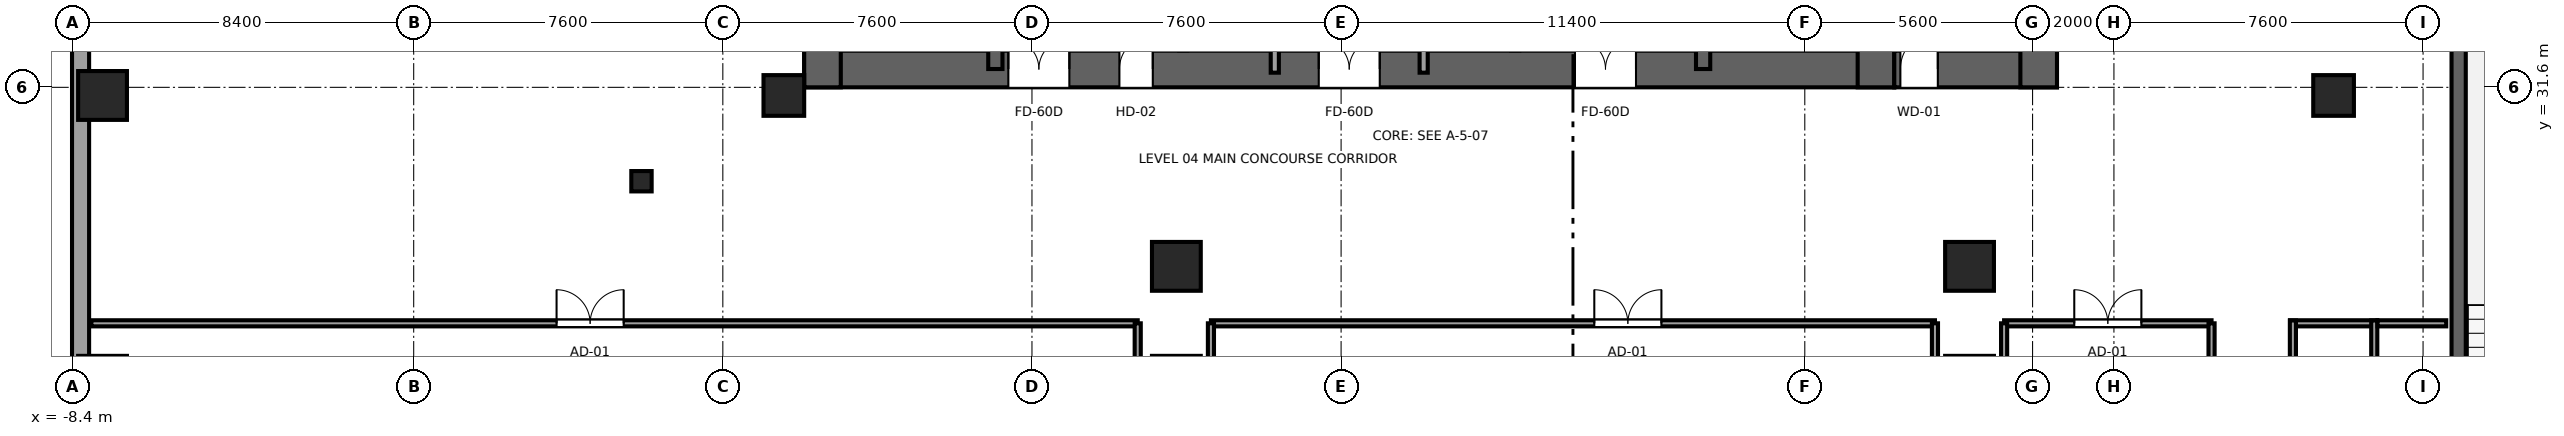
"""IFC4 building model, lengths in metres.
Left out: names, types, materials, properties, quantities, classifications, styles, units other than length and angle.
Written with IfcOpenShell. Run it as: python <this file> out.ifc"""

import sys

from ifc_helpers import new_model, si_unit, direction, frame, frame_2d, origin, origin_2d, place, context, subcontext, project, spatial, rectangle, i_section, extrude, source, transform, mapped, element, fill, save


model = new_model("IFC4")
c1 = context("Model", 3, precision=1e-05, world=origin(), true_north=direction((0.0, 1.0)))
c2 = subcontext(c1, "Body", "Model", "MODEL_VIEW")
j1 = project(units=[si_unit("LENGTHUNIT", "METRE"), si_unit("PLANEANGLEUNIT", "RADIAN")], contexts=[c1])
p1 = place(None, origin())
s1 = spatial("IfcSite", under=j1, at=p1, CompositionType="ELEMENT")
p2 = place(p1, origin())
s2 = spatial("IfcBuilding", under=s1, at=p2, CompositionType="ELEMENT")
p3 = place(p2, frame((0.0, 0.0, 22.4)))
s3 = spatial("IfcBuildingStorey", under=s2, at=p3, CompositionType="ELEMENT", Elevation=22.4)
p4 = place(p3, frame((9.6, 32.05, 0.0), z_axis=(0.0, 0.0, 1.0), x_axis=(1.0, 0.0, 0.0)))
e1 = element("IfcWall", 1, at=p4, inside=s3, PredefinedType="SHEAR", context=c2, shape_type="SweptSolid", body=[
    extrude(rectangle(XDim=26.8, YDim=0.9, at=frame_2d((13.4, 0.0))), origin(), (0.0, 0.0, 1.0), 4.4),
])
p5 = place(p4, frame((6.52, 0.0, 0.0), z_axis=(0.0, 0.0, 1.0), x_axis=(-1.0, 0.0, 0.0)))
e2 = element("IfcOpeningElement", 2, at=p5, cuts=e1, PredefinedType="OPENING", context=c2, shape_type="SweptSolid", body=[
    extrude(rectangle(XDim=1.5, YDim=2.04, at=frame_2d((0.75, 1.02))), frame((0.0, 0.46, 0.0), z_axis=(0.0, -1.0, 0.0), x_axis=(1.0, 0.0, 0.0)), (0.0, 0.0, 1.0), 0.92),
])
p6 = place(p4, frame((14.15, 0.0, 0.0), z_axis=(0.0, 0.0, 1.0), x_axis=(-1.0, 0.0, 0.0)))
e3 = element("IfcOpeningElement", 3, at=p6, cuts=e1, PredefinedType="OPENING", context=c2, shape_type="SweptSolid", body=[
    extrude(rectangle(XDim=1.5, YDim=2.04, at=frame_2d((0.75, 1.02))), frame((0.0, 0.46, 0.0), z_axis=(0.0, -1.0, 0.0), x_axis=(1.0, 0.0, 0.0)), (0.0, 0.0, 1.0), 0.92),
])
p7 = place(p4, frame((20.45, 0.0, 0.0), z_axis=(0.0, 0.0, 1.0), x_axis=(-1.0, 0.0, 0.0)))
e4 = element("IfcOpeningElement", 4, at=p7, cuts=e1, PredefinedType="OPENING", context=c2, shape_type="SweptSolid", body=[
    extrude(rectangle(XDim=1.5, YDim=2.04, at=frame_2d((0.75, 1.02))), frame((0.0, 0.46, 0.0), z_axis=(0.0, -1.0, 0.0), x_axis=(1.0, 0.0, 0.0)), (0.0, 0.0, 1.0), 0.92),
])
p8 = place(p4, frame((8.57, 0.0, 0.0), z_axis=(0.0, 0.0, 1.0), x_axis=(-1.0, 0.0, 0.0)))
e5 = element("IfcOpeningElement", 5, at=p8, cuts=e1, PredefinedType="OPENING", context=c2, shape_type="SweptSolid", body=[
    extrude(rectangle(XDim=0.82, YDim=2.01, at=frame_2d((0.41, 1.005))), frame((0.0, 0.46, 0.0), z_axis=(0.0, -1.0, 0.0), x_axis=(1.0, 0.0, 0.0)), (0.0, 0.0, 1.0), 0.92),
])
for number, where, z_axis, x_axis in (
    (6, (10.05, 31.6, 0.0), (0.0, 0.0, 1.0), (0.0, 1.0, 0.0)),
    (7, (35.95, 31.6, 0.0), (0.0, 0.0, 1.0), (0.0, 1.0, 0.0)),
):
    element("IfcWall", number, at=place(p3, frame(where, z_axis=z_axis, x_axis=x_axis)), inside=s3, PredefinedType="SHEAR", context=c2, shape_type="SweptSolid", body=[
        extrude(rectangle(XDim=13.6, YDim=0.9, at=frame_2d((6.8, 0.0))), origin(), (0.0, 0.0, 1.0), 4.4),
    ])
p9 = place(p3, frame((14.3, 32.05, 0.0), z_axis=(0.0, 0.0, 1.0), x_axis=(0.0, 1.0, 0.0)))
e8 = element("IfcWall", 8, at=p9, inside=s3, PredefinedType="SHEAR", context=c2, shape_type="SweptSolid", body=[
    extrude(rectangle(XDim=12.7, YDim=0.35, at=frame_2d((6.35, 0.0))), origin(), (0.0, 0.0, 1.0), 4.4),
])
p10 = place(p9, frame((0.5, 0.0, 0.0)))
e9 = element("IfcOpeningElement", 9, at=p10, cuts=e8, PredefinedType="OPENING", context=c2, shape_type="SweptSolid", body=[
    extrude(rectangle(XDim=1.1, YDim=2.12, at=frame_2d((0.55, 1.06))), frame((0.0, 0.185, 0.0), z_axis=(0.0, -1.0, 0.0), x_axis=(1.0, 0.0, 0.0)), (0.0, 0.0, 1.0), 0.37),
])
p11 = place(p3, frame((31.7, 32.05, 0.0), z_axis=(0.0, 0.0, 1.0), x_axis=(0.0, 1.0, 0.0)))
e10 = element("IfcWall", 10, at=p11, inside=s3, PredefinedType="SHEAR", context=c2, shape_type="SweptSolid", body=[
    extrude(rectangle(XDim=12.7, YDim=0.35, at=frame_2d((6.35, 0.0))), origin(), (0.0, 0.0, 1.0), 4.4),
])
p12 = place(p11, frame((1.6, 0.0, 0.0), z_axis=(0.0, 0.0, 1.0), x_axis=(-1.0, 0.0, 0.0)))
e11 = element("IfcOpeningElement", 11, at=p12, cuts=e10, PredefinedType="OPENING", context=c2, shape_type="SweptSolid", body=[
    extrude(rectangle(XDim=1.1, YDim=2.12, at=frame_2d((0.55, 1.06))), frame((0.0, 0.185, 0.0), z_axis=(0.0, -1.0, 0.0), x_axis=(1.0, 0.0, 0.0)), (0.0, 0.0, 1.0), 0.37),
])
p13 = place(p3, frame((36.4, 32.05, 0.0), z_axis=(0.0, 0.0, 1.0), x_axis=(1.0, 0.0, 0.0)))
e12 = element("IfcWall", 12, at=p13, inside=s3, PredefinedType="SHEAR", context=c2, shape_type="SweptSolid", body=[
    extrude(rectangle(XDim=4.0, YDim=0.9, at=frame_2d((2.0, 0.0))), origin(), (0.0, 0.0, 1.0), 4.4),
])
p14 = place(p13, frame((1.07, 0.0, 0.0), z_axis=(0.0, 0.0, 1.0), x_axis=(-1.0, 0.0, 0.0)))
e13 = element("IfcOpeningElement", 13, at=p14, cuts=e12, PredefinedType="OPENING", context=c2, shape_type="SweptSolid", body=[
    extrude(rectangle(XDim=0.92, YDim=2.01, at=frame_2d((0.46, 1.005))), frame((0.0, 0.46, 0.0), z_axis=(0.0, -1.0, 0.0), x_axis=(1.0, 0.0, 0.0)), (0.0, 0.0, 1.0), 0.92),
])
p15 = place(p3, frame((39.95, 31.6, 0.0), z_axis=(0.0, 0.0, 1.0), x_axis=(0.0, 1.0, 0.0)))
e14 = element("IfcWall", 14, at=p15, inside=s3, PredefinedType="SHEAR", context=c2, shape_type="SweptSolid", body=[
    extrude(rectangle(XDim=13.6, YDim=0.9, at=frame_2d((6.8, 0.0))), origin(), (0.0, 0.0, 1.0), 4.4),
])
p16 = place(p3, frame((50.275, 32.975, 0.0), z_axis=(0.0, 0.0, 1.0), x_axis=(0.0, -1.0, 0.0)))
e15 = element("IfcWall", 15, at=p16, inside=s3, PredefinedType="SHEAR", context=c2, shape_type="SweptSolid", body=[
    extrude(rectangle(XDim=12.95, YDim=0.35, at=frame_2d((6.475, 0.0))), origin(), (0.0, 0.0, 1.0), 4.4),
])
m1 = source(origin(), c2, "Body", "SweptSolid", [
    extrude(rectangle(XDim=1.2, YDim=1.2, at=origin_2d()), origin(), (0.0, 0.0, 1.0), 4.4),
])
for number, where, z_axis, x_axis in (
    (16, (-7.65, 24.4, 0.0), (0.0, 0.0, 1.0), (1.0, 0.0, 0.0)),
    (17, (-7.65, 31.4, 0.0), (0.0, 0.0, 1.0), (1.0, 0.0, 0.0)),
    (18, (18.75, 24.4, 0.0), (0.0, 0.0, 1.0), (1.0, 0.0, 0.0)),
    (19, (38.25, 24.4, 0.0), (0.0, 0.0, 1.0), (1.0, 0.0, 0.0)),
    (20, (18.75, 27.2, 0.0), (0.0, 0.0, 1.0), (1.0, 0.0, 0.0)),
    (21, (38.25, 27.2, 0.0), (0.0, 0.0, 1.0), (1.0, 0.0, 0.0)),
):
    element("IfcColumn", number, at=place(p3, frame(where, z_axis=z_axis, x_axis=x_axis)), inside=s3, PredefinedType="COLUMN", context=c2, shape_type="MappedRepresentation", body=[
        mapped(m1, transform((0.0, 0.0, 0.0), x_axis=(1.0, 0.0, 0.0), y_axis=(0.0, 1.0, 0.0), z_axis=(0.0, 0.0, 1.0), scale=1.0)),
    ])
m2 = source(origin(), c2, "Body", "SweptSolid", [
    extrude(rectangle(XDim=1.0, YDim=1.0, at=origin_2d()), origin(), (0.0, 0.0, 1.0), 4.4),
])
for number, where, z_axis, x_axis in (
    (22, (47.2, 31.4, 0.0), (0.0, 0.0, 1.0), (1.0, 0.0, 0.0)),
    (23, (9.1, 31.4, 0.0), (0.0, 0.0, 1.0), (1.0, 0.0, 0.0)),
):
    element("IfcColumn", number, at=place(p3, frame(where, z_axis=z_axis, x_axis=x_axis)), inside=s3, PredefinedType="COLUMN", context=c2, shape_type="MappedRepresentation", body=[
        mapped(m2, transform((0.0, 0.0, 0.0), x_axis=(1.0, 0.0, 0.0), y_axis=(0.0, 1.0, 0.0), z_axis=(0.0, 0.0, 1.0), scale=1.0)),
    ])
m3 = source(origin(), c2, "Body", "SweptSolid", [
    extrude(i_section(OverallWidth=0.5, OverallDepth=0.5, WebThickness=0.028, FlangeThickness=0.045, at=origin_2d()), origin(), (0.0, 0.0, 1.0), 4.4),
])
p17 = place(p3, frame((5.6, 29.292, 0.0), z_axis=(0.0, 0.0, 1.0), x_axis=(1.0, 0.0, 0.0)))
e24 = element("IfcColumn", 24, at=p17, inside=s3, PredefinedType="COLUMN", context=c2, shape_type="MappedRepresentation", body=[
    mapped(m3, transform((0.0, 0.0, 0.0), x_axis=(1.0, 0.0, 0.0), y_axis=(0.0, 1.0, 0.0), z_axis=(0.0, 0.0, 1.0), scale=1.0)),
])
p18 = place(p3, frame((-8.19, 48.29, 0.0), z_axis=(0.0, 0.0, 1.0), x_axis=(0.0, -1.0, 0.0)))
e25 = element("IfcWall", 25, at=p18, inside=s3, PredefinedType="SOLIDWALL", context=c2, shape_type="SweptSolid", body=[
    extrude(rectangle(XDim=50.7, YDim=0.42, at=frame_2d((25.35, 0.0))), origin(), (0.0, 0.0, 1.0), 4.14),
])
p19 = place(p18, frame((5.85, 0.0, 0.65)))
e26 = element("IfcOpeningElement", 26, at=p19, cuts=e25, PredefinedType="OPENING", context=c2, shape_type="SweptSolid", body=[
    extrude(rectangle(XDim=3.0, YDim=2.5, at=frame_2d((1.5, 1.25))), frame((0.0, 0.22, 0.0), z_axis=(0.0, -1.0, 0.0), x_axis=(1.0, 0.0, 0.0)), (0.0, 0.0, 1.0), 0.44),
])
p20 = place(p18, frame((10.35, 0.0, 0.65)))
e27 = element("IfcOpeningElement", 27, at=p20, cuts=e25, PredefinedType="OPENING", context=c2, shape_type="SweptSolid", body=[
    extrude(rectangle(XDim=3.0, YDim=2.5, at=frame_2d((1.5, 1.25))), frame((0.0, 0.22, 0.0), z_axis=(0.0, -1.0, 0.0), x_axis=(1.0, 0.0, 0.0)), (0.0, 0.0, 1.0), 0.44),
])
p21 = place(p18, frame((24.9, 0.0, 0.65)))
e28 = element("IfcOpeningElement", 28, at=p21, cuts=e25, PredefinedType="OPENING", context=c2, shape_type="SweptSolid", body=[
    extrude(rectangle(XDim=3.0, YDim=2.5, at=frame_2d((1.5, 1.25))), frame((0.0, 0.22, 0.0), z_axis=(0.0, -1.0, 0.0), x_axis=(1.0, 0.0, 0.0)), (0.0, 0.0, 1.0), 0.44),
])
p22 = place(p18, frame((28.35, 0.0, 0.65)))
e29 = element("IfcOpeningElement", 29, at=p22, cuts=e25, PredefinedType="OPENING", context=c2, shape_type="SweptSolid", body=[
    extrude(rectangle(XDim=3.0, YDim=2.5, at=frame_2d((1.5, 1.25))), frame((0.0, 0.22, 0.0), z_axis=(0.0, -1.0, 0.0), x_axis=(1.0, 0.0, 0.0)), (0.0, 0.0, 1.0), 0.44),
])
p23 = place(p18, frame((33.4, 0.0, 0.65)))
e30 = element("IfcOpeningElement", 30, at=p23, cuts=e25, PredefinedType="OPENING", context=c2, shape_type="SweptSolid", body=[
    extrude(rectangle(XDim=3.0, YDim=2.5, at=frame_2d((1.5, 1.25))), frame((0.0, 0.22, 0.0), z_axis=(0.0, -1.0, 0.0), x_axis=(1.0, 0.0, 0.0)), (0.0, 0.0, 1.0), 0.44),
])
p24 = place(p18, frame((41.85, 0.0, 0.65)))
e31 = element("IfcOpeningElement", 31, at=p24, cuts=e25, PredefinedType="OPENING", context=c2, shape_type="SweptSolid", body=[
    extrude(rectangle(XDim=3.0, YDim=2.5, at=frame_2d((1.5, 1.25))), frame((0.0, 0.22, 0.0), z_axis=(0.0, -1.0, 0.0), x_axis=(1.0, 0.0, 0.0)), (0.0, 0.0, 1.0), 0.44),
])
for number, where, z_axis, x_axis in (
    (32, (21.17, 31.96, 0.0), (0.0, 0.0, 1.0), (0.0, 1.0, 0.0)),
    (33, (24.83, 31.96, 0.0), (0.0, 0.0, 1.0), (0.0, 1.0, 0.0)),
):
    element("IfcWall", number, at=place(p3, frame(where, z_axis=z_axis, x_axis=x_axis)), inside=s3, PredefinedType="SOLIDWALL", context=c2, shape_type="SweptSolid", body=[
        extrude(rectangle(XDim=12.58, YDim=0.2, at=frame_2d((6.29, 0.0))), origin(), (0.0, 0.0, 1.0), 4.14),
    ])
p25 = place(p3, frame((-7.925, 25.8, 0.0), z_axis=(0.0, 0.0, 1.0), x_axis=(1.0, 0.0, 0.0)))
e34 = element("IfcWall", 34, at=p25, inside=s3, PredefinedType="PARTITIONING", context=c2, shape_type="SweptSolid", body=[
    extrude(rectangle(XDim=25.725, YDim=0.15, at=frame_2d((12.863, 0.0))), origin(), (0.0, 0.0, 1.0), 4.14),
])
p26 = place(p25, frame((11.438, 0.0, 0.0)))
e35 = element("IfcOpeningElement", 35, at=p26, cuts=e34, PredefinedType="OPENING", context=c2, shape_type="SweptSolid", body=[
    extrude(rectangle(XDim=1.65, YDim=2.15, at=frame_2d((0.825, 1.075))), frame((0.0, 0.085, 0.0), z_axis=(0.0, -1.0, 0.0), x_axis=(1.0, 0.0, 0.0)), (0.0, 0.0, 1.0), 0.17),
])
p27 = place(p3, frame((17.8, -2.0, 0.0), z_axis=(0.0, 0.0, 1.0), x_axis=(0.0, 1.0, 0.0)))
e36 = element("IfcWall", 36, at=p27, inside=s3, PredefinedType="PARTITIONING", context=c2, shape_type="SweptSolid", body=[
    extrude(rectangle(XDim=27.8, YDim=0.15, at=frame_2d((13.9, 0.0))), origin(), (0.0, 0.0, 1.0), 4.14),
])
p28 = place(p3, frame((19.6, 25.8, 0.0), z_axis=(0.0, 0.0, 1.0), x_axis=(1.0, 0.0, 0.0)))
e37 = element("IfcWall", 37, at=p28, inside=s3, PredefinedType="PARTITIONING", context=c2, shape_type="SweptSolid", body=[
    extrude(rectangle(XDim=17.8, YDim=0.15, at=frame_2d((8.9, 0.0))), origin(), (0.0, 0.0, 1.0), 4.14),
])
p29 = place(p28, frame((9.425, 0.0, 0.0)))
e38 = element("IfcOpeningElement", 38, at=p29, cuts=e37, PredefinedType="OPENING", context=c2, shape_type="SweptSolid", body=[
    extrude(rectangle(XDim=1.65, YDim=2.15, at=frame_2d((0.825, 1.075))), frame((0.0, 0.085, 0.0), z_axis=(0.0, -1.0, 0.0), x_axis=(1.0, 0.0, 0.0)), (0.0, 0.0, 1.0), 0.17),
])
for number, where, z_axis, x_axis in (
    (39, (19.6, -2.0, 0.0), (0.0, 0.0, 1.0), (0.0, 1.0, 0.0)),
    (40, (37.4, -2.0, 0.0), (0.0, 0.0, 1.0), (0.0, 1.0, 0.0)),
):
    element("IfcWall", number, at=place(p3, frame(where, z_axis=z_axis, x_axis=x_axis)), inside=s3, PredefinedType="PARTITIONING", context=c2, shape_type="SweptSolid", body=[
        extrude(rectangle(XDim=27.8, YDim=0.15, at=frame_2d((13.9, 0.0))), origin(), (0.0, 0.0, 1.0), 4.14),
    ])
p30 = place(p3, frame((39.1, 25.8, 0.0), z_axis=(0.0, 0.0, 1.0), x_axis=(1.0, 0.0, 0.0)))
e41 = element("IfcWall", 41, at=p30, inside=s3, PredefinedType="PARTITIONING", context=c2, shape_type="SweptSolid", body=[
    extrude(rectangle(XDim=5.1, YDim=0.15, at=frame_2d((2.55, 0.0))), origin(), (0.0, 0.0, 1.0), 4.14),
])
p31 = place(p30, frame((1.725, 0.0, 0.0)))
e42 = element("IfcOpeningElement", 42, at=p31, cuts=e41, PredefinedType="OPENING", context=c2, shape_type="SweptSolid", body=[
    extrude(rectangle(XDim=1.65, YDim=2.15, at=frame_2d((0.825, 1.075))), frame((0.0, 0.085, 0.0), z_axis=(0.0, -1.0, 0.0), x_axis=(1.0, 0.0, 0.0)), (0.0, 0.0, 1.0), 0.17),
])
p32 = place(p3, frame((39.1, -2.0, 0.0), z_axis=(0.0, 0.0, 1.0), x_axis=(0.0, 1.0, 0.0)))
e43 = element("IfcWall", 43, at=p32, inside=s3, PredefinedType="PARTITIONING", context=c2, shape_type="SweptSolid", body=[
    extrude(rectangle(XDim=27.8, YDim=0.15, at=frame_2d((13.9, 0.0))), origin(), (0.0, 0.0, 1.0), 4.14),
])
p33 = place(p3, frame((44.2, -2.0, 0.0), z_axis=(0.0, 0.0, 1.0), x_axis=(0.0, 1.0, 0.0)))
e44 = element("IfcWall", 44, at=p33, inside=s3, PredefinedType="PARTITIONING", context=c2, shape_type="SweptSolid", body=[
    extrude(rectangle(XDim=27.8, YDim=0.15, at=frame_2d((13.9, 0.0))), origin(), (0.0, 0.0, 1.0), 3.676),
])
p34 = place(p3, frame((46.13, 25.8, 0.0), z_axis=(0.0, 0.0, 1.0), x_axis=(1.0, 0.0, 0.0)))
e45 = element("IfcWall", 45, at=p34, inside=s3, PredefinedType="PARTITIONING", context=c2, shape_type="SweptSolid", body=[
    extrude(rectangle(XDim=2.14, YDim=0.15, at=frame_2d((1.07, 0.0))), origin(), (0.0, 0.0, 1.0), 4.14),
])
p35 = place(p3, frame((46.2, 20.48, 0.0), z_axis=(0.0, 0.0, 1.0), x_axis=(0.0, 1.0, 0.0)))
e46 = element("IfcWall", 46, at=p35, inside=s3, PredefinedType="PARTITIONING", context=c2, shape_type="SweptSolid", body=[
    extrude(rectangle(XDim=5.39, YDim=0.15, at=frame_2d((2.695, 0.0))), origin(), (0.0, 0.0, 1.0), 4.14),
])
p36 = place(p35, frame((1.635, 0.0, 0.0)))
e47 = element("IfcOpeningElement", 47, at=p36, cuts=e46, PredefinedType="OPENING", context=c2, shape_type="SweptSolid", body=[
    extrude(rectangle(XDim=0.92, YDim=2.01, at=frame_2d((0.46, 1.005))), frame((0.0, 0.085, 0.0), z_axis=(0.0, -1.0, 0.0), x_axis=(1.0, 0.0, 0.0)), (0.0, 0.0, 1.0), 0.17),
])
p37 = place(p3, frame((48.2, 20.48, 0.0), z_axis=(0.0, 0.0, 1.0), x_axis=(0.0, 1.0, 0.0)))
e48 = element("IfcWall", 48, at=p37, inside=s3, PredefinedType="PARTITIONING", context=c2, shape_type="SweptSolid", body=[
    extrude(rectangle(XDim=5.39, YDim=0.15, at=frame_2d((2.695, 0.0))), origin(), (0.0, 0.0, 1.0), 4.14),
])
p38 = place(p3, frame((48.28, 25.8, 0.0), z_axis=(0.0, 0.0, 1.0), x_axis=(1.0, 0.0, 0.0)))
e49 = element("IfcWall", 49, at=p38, inside=s3, PredefinedType="PARTITIONING", context=c2, shape_type="SweptSolid", body=[
    extrude(rectangle(XDim=1.69, YDim=0.15, at=frame_2d((0.845, 0.0))), origin(), (0.0, 0.0, 1.0), 4.14),
])
m4 = source(origin(), c2, "Body", "SweptSolid", [
    extrude(rectangle(XDim=1.5, YDim=2.04, at=frame_2d((0.75, 1.02))), frame((0.0, 0.025, 0.0), z_axis=(0.0, -1.0, 0.0), x_axis=(1.0, 0.0, 0.0)), (0.0, 0.0, 1.0), 0.05),
])
p39 = place(p5, origin())
e50 = element("IfcDoor", 50, at=p39, inside=s3, OperationType="DOUBLE_DOOR_SINGLE_SWING", PredefinedType="DOOR", context=c2, shape_type="MappedRepresentation", body=[
    mapped(m4, transform((0.0, 0.0, 0.0), x_axis=(1.0, 0.0, 0.0), y_axis=(0.0, 1.0, 0.0), z_axis=(0.0, 0.0, 1.0), scale=1.0)),
])
fill(e2, e50)
p40 = place(p6, origin())
e51 = element("IfcDoor", 51, at=p40, inside=s3, OperationType="DOUBLE_DOOR_SINGLE_SWING", PredefinedType="DOOR", context=c2, shape_type="MappedRepresentation", body=[
    mapped(m4, transform((0.0, 0.0, 0.0), x_axis=(1.0, 0.0, 0.0), y_axis=(0.0, 1.0, 0.0), z_axis=(0.0, 0.0, 1.0), scale=1.0)),
])
fill(e3, e51)
p41 = place(p7, origin())
e52 = element("IfcDoor", 52, at=p41, inside=s3, OperationType="DOUBLE_DOOR_SINGLE_SWING", PredefinedType="DOOR", context=c2, shape_type="MappedRepresentation", body=[
    mapped(m4, transform((0.0, 0.0, 0.0), x_axis=(1.0, 0.0, 0.0), y_axis=(0.0, 1.0, 0.0), z_axis=(0.0, 0.0, 1.0), scale=1.0)),
])
fill(e4, e52)
m5 = source(origin(), c2, "Body", "SweptSolid", [
    extrude(rectangle(XDim=0.82, YDim=2.01, at=frame_2d((0.41, 1.005))), frame((0.0, 0.025, 0.0), z_axis=(0.0, -1.0, 0.0), x_axis=(1.0, 0.0, 0.0)), (0.0, 0.0, 1.0), 0.05),
])
p42 = place(p8, origin())
e53 = element("IfcDoor", 53, at=p42, inside=s3, OperationType="SINGLE_SWING_RIGHT", PredefinedType="DOOR", context=c2, shape_type="MappedRepresentation", body=[
    mapped(m5, transform((0.0, 0.0, 0.0), x_axis=(1.0, 0.0, 0.0), y_axis=(0.0, 1.0, 0.0), z_axis=(0.0, 0.0, 1.0), scale=1.0)),
])
fill(e5, e53)
m6 = source(origin(), c2, "Body", "SweptSolid", [
    extrude(rectangle(XDim=0.92, YDim=2.01, at=frame_2d((0.46, 1.005))), frame((0.0, 0.025, 0.0), z_axis=(0.0, -1.0, 0.0), x_axis=(1.0, 0.0, 0.0)), (0.0, 0.0, 1.0), 0.05),
])
p43 = place(p14, origin())
e54 = element("IfcDoor", 54, at=p43, inside=s3, OperationType="SINGLE_SWING_RIGHT", PredefinedType="DOOR", context=c2, shape_type="MappedRepresentation", body=[
    mapped(m6, transform((0.0, 0.0, 0.0), x_axis=(1.0, 0.0, 0.0), y_axis=(0.0, 1.0, 0.0), z_axis=(0.0, 0.0, 1.0), scale=1.0)),
])
fill(e13, e54)
m7 = source(origin(), c2, "Body", "SweptSolid", [
    extrude(rectangle(XDim=1.65, YDim=2.15, at=frame_2d((0.825, 1.075))), frame((0.0, 0.025, 0.0), z_axis=(0.0, -1.0, 0.0), x_axis=(1.0, 0.0, 0.0)), (0.0, 0.0, 1.0), 0.05),
])
p44 = place(p26, origin())
e55 = element("IfcDoor", 55, at=p44, inside=s3, OperationType="DOUBLE_DOOR_SINGLE_SWING", PredefinedType="DOOR", context=c2, shape_type="MappedRepresentation", body=[
    mapped(m7, transform((0.0, 0.0, 0.0), x_axis=(1.0, 0.0, 0.0), y_axis=(0.0, 1.0, 0.0), z_axis=(0.0, 0.0, 1.0), scale=1.0)),
])
fill(e35, e55)
p45 = place(p29, origin())
e56 = element("IfcDoor", 56, at=p45, inside=s3, OperationType="DOUBLE_DOOR_SINGLE_SWING", PredefinedType="DOOR", context=c2, shape_type="MappedRepresentation", body=[
    mapped(m7, transform((0.0, 0.0, 0.0), x_axis=(1.0, 0.0, 0.0), y_axis=(0.0, 1.0, 0.0), z_axis=(0.0, 0.0, 1.0), scale=1.0)),
])
fill(e38, e56)
p46 = place(p31, origin())
e57 = element("IfcDoor", 57, at=p46, inside=s3, OperationType="DOUBLE_DOOR_SINGLE_SWING", PredefinedType="DOOR", context=c2, shape_type="MappedRepresentation", body=[
    mapped(m7, transform((0.0, 0.0, 0.0), x_axis=(1.0, 0.0, 0.0), y_axis=(0.0, 1.0, 0.0), z_axis=(0.0, 0.0, 1.0), scale=1.0)),
])
fill(e42, e57)
save(model, sys.argv[1])
